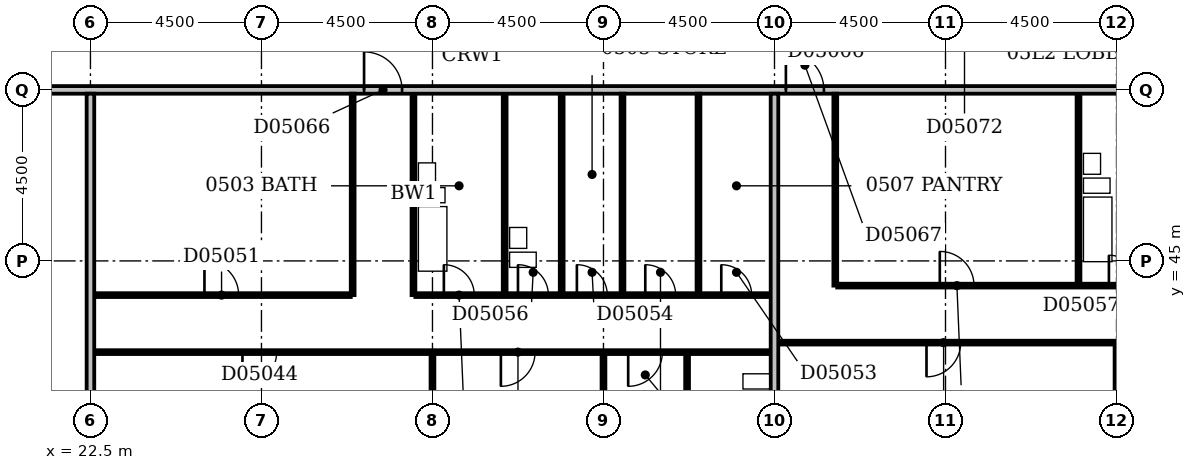
"""IFC4 building model, lengths in metres.
Left out: names, types, materials, properties, quantities, classifications, styles, units other than length and angle.
Written with IfcOpenShell. Run it as: python <this file> out.ifc"""

import sys

from ifc_helpers import new_model, si_unit, direction, frame, frame_2d, origin, place, context, subcontext, project, spatial, rectangle, extrude, element, fill, save


model = new_model("IFC4")
c1 = context("Model", 3, precision=1e-05, world=origin(), true_north=direction((0.0, 1.0)))
c2 = subcontext(c1, "Body", "Model", "MODEL_VIEW")
j1 = project(units=[si_unit("LENGTHUNIT", "METRE"), si_unit("PLANEANGLEUNIT", "RADIAN")], contexts=[c1])
p1 = place(None, origin())
s1 = spatial("IfcSite", under=j1, at=p1, CompositionType="ELEMENT")
p2 = place(p1, origin())
s2 = spatial("IfcBuilding", under=s1, at=p2, CompositionType="ELEMENT")
p3 = place(p2, frame((0.0, 0.0, 29.0)))
s3 = spatial("IfcBuildingStorey", under=s2, at=p3, CompositionType="ELEMENT", Elevation=29.0)
p4 = place(p3, frame((22.5, 36.6, 0.0), z_axis=(0.0, 0.0, 1.0), x_axis=(0.0, 1.0, 0.0)))
e1 = element("IfcWall", 1, at=p4, inside=s3, PredefinedType="PARTITIONING", context=c2, shape_type="SweptSolid", body=[
    extrude(rectangle(XDim=12.8, YDim=0.2, at=frame_2d((6.4, 0.0))), origin(), (0.0, 0.0, 1.0), 3.3),
])
p5 = place(p3, frame((31.5, 36.6, 0.0), z_axis=(0.0, 0.0, 1.0), x_axis=(0.0, 1.0, 0.0)))
e2 = element("IfcWall", 2, at=p5, inside=s3, PredefinedType="PARTITIONING", context=c2, shape_type="SweptSolid", body=[
    extrude(rectangle(XDim=5.95, YDim=0.1, at=frame_2d((2.975, 0.0))), origin(), (0.0, 0.0, 1.0), 3.3),
])
p6 = place(p3, frame((36.0, 36.6, 0.0), z_axis=(0.0, 0.0, 1.0), x_axis=(0.0, 1.0, 0.0)))
e3 = element("IfcWall", 3, at=p6, inside=s3, PredefinedType="PARTITIONING", context=c2, shape_type="SweptSolid", body=[
    extrude(rectangle(XDim=5.95, YDim=0.1, at=frame_2d((2.975, 0.0))), origin(), (0.0, 0.0, 1.0), 2.4),
])
p7 = place(p3, frame((40.5, 36.6, 0.0), z_axis=(0.0, 0.0, 1.0), x_axis=(0.0, 1.0, 0.0)))
e4 = element("IfcWall", 4, at=p7, inside=s3, PredefinedType="PARTITIONING", context=c2, shape_type="SweptSolid", body=[
    extrude(rectangle(XDim=12.8, YDim=0.2, at=frame_2d((6.4, 0.0))), origin(), (0.0, 0.0, 1.0), 3.3),
])
p8 = place(p3, frame((49.5, 36.6, 0.0), z_axis=(0.0, 0.0, 1.0), x_axis=(0.0, 1.0, 0.0)))
e5 = element("IfcWall", 5, at=p8, inside=s3, PredefinedType="PARTITIONING", context=c2, shape_type="SweptSolid", body=[
    extrude(rectangle(XDim=6.2, YDim=0.1, at=frame_2d((3.1, 0.0))), origin(), (0.0, 0.0, 1.0), 3.3),
])
p9 = place(p3, frame((38.2, 39.7, 0.0), z_axis=(0.0, 0.0, 1.0), x_axis=(0.0, 1.0, 0.0)))
e6 = element("IfcWall", 6, at=p9, inside=s3, PredefinedType="PLUMBINGWALL", context=c2, shape_type="SweptSolid", body=[
    extrude(rectangle(XDim=2.85, YDim=0.1, at=frame_2d((1.425, 0.0))), origin(), (0.0, 0.0, 1.0), 3.3),
])
p10 = place(p9, frame((1.05, 0.0, 0.0)))
e7 = element("IfcOpeningElement", 7, at=p10, cuts=e6, PredefinedType="OPENING", context=c2, shape_type="SweptSolid", body=[
    extrude(rectangle(XDim=0.8, YDim=2.1, at=frame_2d((0.4, 1.05))), frame((0.0, 0.062, 0.0), z_axis=(0.0, -1.0, 0.0), x_axis=(1.0, 0.0, 0.0)), (0.0, 0.0, 1.0), 0.124),
])
p11 = place(p3, frame((22.6, 42.6, 0.0), z_axis=(0.0, 0.0, 1.0), x_axis=(1.0, 0.0, 0.0)))
e8 = element("IfcWall", 8, at=p11, inside=s3, PredefinedType="PARTITIONING", context=c2, shape_type="SweptSolid", body=[
    extrude(rectangle(XDim=17.8, YDim=0.1, at=frame_2d((8.9, 0.0))), origin(), (0.0, 0.0, 1.0), 3.3),
])
p12 = place(p11, frame((3.9, 0.0, 0.0)))
e9 = element("IfcOpeningElement", 9, at=p12, cuts=e8, PredefinedType="OPENING", context=c2, shape_type="SweptSolid", body=[
    extrude(rectangle(XDim=0.9, YDim=2.1, at=frame_2d((0.45, 1.05))), frame((0.0, 0.062, 0.0), z_axis=(0.0, -1.0, 0.0), x_axis=(1.0, 0.0, 0.0)), (0.0, 0.0, 1.0), 0.124),
])
p13 = place(p11, frame((10.7, 0.0, 0.0)))
e10 = element("IfcOpeningElement", 10, at=p13, cuts=e8, PredefinedType="OPENING", context=c2, shape_type="SweptSolid", body=[
    extrude(rectangle(XDim=0.9, YDim=2.1, at=frame_2d((0.45, 1.05))), frame((0.0, 0.062, 0.0), z_axis=(0.0, -1.0, 0.0), x_axis=(1.0, 0.0, 0.0)), (0.0, 0.0, 1.0), 0.124),
])
p14 = place(p11, frame((14.05, 0.0, 0.0)))
e11 = element("IfcOpeningElement", 11, at=p14, cuts=e8, PredefinedType="OPENING", context=c2, shape_type="SweptSolid", body=[
    extrude(rectangle(XDim=0.9, YDim=2.1, at=frame_2d((0.45, 1.05))), frame((0.0, 0.062, 0.0), z_axis=(0.0, -1.0, 0.0), x_axis=(1.0, 0.0, 0.0)), (0.0, 0.0, 1.0), 0.124),
])
p15 = place(p3, frame((40.6, 42.85, 0.0), z_axis=(0.0, 0.0, 1.0), x_axis=(1.0, 0.0, 0.0)))
e12 = element("IfcWall", 12, at=p15, inside=s3, PredefinedType="PARTITIONING", context=c2, shape_type="SweptSolid", body=[
    extrude(rectangle(XDim=13.3, YDim=0.1, at=frame_2d((6.65, 0.0))), origin(), (0.0, 0.0, 1.0), 3.3),
])
p16 = place(p15, frame((3.9, 0.0, 0.0)))
e13 = element("IfcOpeningElement", 13, at=p16, cuts=e12, PredefinedType="OPENING", context=c2, shape_type="SweptSolid", body=[
    extrude(rectangle(XDim=0.9, YDim=2.1, at=frame_2d((0.45, 1.05))), frame((0.0, 0.062, 0.0), z_axis=(0.0, -1.0, 0.0), x_axis=(1.0, 0.0, 0.0)), (0.0, 0.0, 1.0), 0.124),
])
p17 = place(p15, frame((10.7, 0.0, 0.0)))
e14 = element("IfcOpeningElement", 14, at=p17, cuts=e12, PredefinedType="OPENING", context=c2, shape_type="SweptSolid", body=[
    extrude(rectangle(XDim=0.9, YDim=2.1, at=frame_2d((0.45, 1.05))), frame((0.0, 0.062, 0.0), z_axis=(0.0, -1.0, 0.0), x_axis=(1.0, 0.0, 0.0)), (0.0, 0.0, 1.0), 0.124),
])
p18 = place(p3, frame((22.6, 44.1, 0.0), z_axis=(0.0, 0.0, 1.0), x_axis=(1.0, 0.0, 0.0)))
e15 = element("IfcWall", 15, at=p18, inside=s3, PredefinedType="PARTITIONING", context=c2, shape_type="SweptSolid", body=[
    extrude(rectangle(XDim=6.75, YDim=0.1, at=frame_2d((3.375, 0.0))), origin(), (0.0, 0.0, 1.0), 3.3),
])
p19 = place(p18, frame((2.9, 0.0, 0.0)))
e16 = element("IfcOpeningElement", 16, at=p19, cuts=e15, PredefinedType="OPENING", context=c2, shape_type="SweptSolid", body=[
    extrude(rectangle(XDim=0.9, YDim=2.1, at=frame_2d((0.45, 1.05))), frame((0.0, 0.062, 0.0), z_axis=(0.0, -1.0, 0.0), x_axis=(1.0, 0.0, 0.0)), (0.0, 0.0, 1.0), 0.124),
])
p20 = place(p3, frame((29.4, 44.1, 0.0), z_axis=(0.0, 0.0, 1.0), x_axis=(0.0, 1.0, 0.0)))
e17 = element("IfcWall", 17, at=p20, inside=s3, PredefinedType="PARTITIONING", context=c2, shape_type="SweptSolid", body=[
    extrude(rectangle(XDim=5.3, YDim=0.1, at=frame_2d((2.65, 0.0))), origin(), (0.0, 0.0, 1.0), 3.3),
])
p21 = place(p3, frame((31.0, 44.1, 0.0), z_axis=(0.0, 0.0, 1.0), x_axis=(0.0, 1.0, 0.0)))
e18 = element("IfcWall", 18, at=p21, inside=s3, PredefinedType="PLUMBINGWALL", context=c2, shape_type="SweptSolid", body=[
    extrude(rectangle(XDim=5.3, YDim=0.1, at=frame_2d((2.65, 0.0))), origin(), (0.0, 0.0, 1.0), 3.3),
])
p22 = place(p3, frame((31.05, 44.1, 0.0), z_axis=(0.0, 0.0, 1.0), x_axis=(1.0, 0.0, 0.0)))
e19 = element("IfcWall", 19, at=p22, inside=s3, PredefinedType="PARTITIONING", context=c2, shape_type="SweptSolid", body=[
    extrude(rectangle(XDim=9.35, YDim=0.1, at=frame_2d((4.675, 0.0))), origin(), (0.0, 0.0, 1.0), 3.3),
])
p23 = place(p22, frame((0.75, 0.0, 0.0)))
e20 = element("IfcOpeningElement", 20, at=p23, cuts=e19, PredefinedType="OPENING", context=c2, shape_type="SweptSolid", body=[
    extrude(rectangle(XDim=0.8, YDim=2.1, at=frame_2d((0.4, 1.05))), frame((0.0, 0.062, 0.0), z_axis=(0.0, -1.0, 0.0), x_axis=(1.0, 0.0, 0.0)), (0.0, 0.0, 1.0), 0.124),
])
p24 = place(p22, frame((8.05, 0.0, 0.0)))
e21 = element("IfcOpeningElement", 21, at=p24, cuts=e19, PredefinedType="OPENING", context=c2, shape_type="SweptSolid", body=[
    extrude(rectangle(XDim=0.8, YDim=2.1, at=frame_2d((0.4, 1.05))), frame((0.0, 0.062, 0.0), z_axis=(0.0, -1.0, 0.0), x_axis=(1.0, 0.0, 0.0)), (0.0, 0.0, 1.0), 0.124),
])
p25 = place(p22, frame((4.25, 0.0, 0.0)))
e22 = element("IfcOpeningElement", 22, at=p25, cuts=e19, PredefinedType="OPENING", context=c2, shape_type="SweptSolid", body=[
    extrude(rectangle(XDim=0.8, YDim=2.1, at=frame_2d((0.4, 1.05))), frame((0.0, 0.062, 0.0), z_axis=(0.0, -1.0, 0.0), x_axis=(1.0, 0.0, 0.0)), (0.0, 0.0, 1.0), 0.124),
])
p26 = place(p22, frame((6.05, 0.0, 0.0)))
e23 = element("IfcOpeningElement", 23, at=p26, cuts=e19, PredefinedType="OPENING", context=c2, shape_type="SweptSolid", body=[
    extrude(rectangle(XDim=0.8, YDim=2.1, at=frame_2d((0.4, 1.05))), frame((0.0, 0.062, 0.0), z_axis=(0.0, -1.0, 0.0), x_axis=(1.0, 0.0, 0.0)), (0.0, 0.0, 1.0), 0.124),
])
p27 = place(p22, frame((2.7, 0.0, 0.0)))
e24 = element("IfcOpeningElement", 24, at=p27, cuts=e19, PredefinedType="OPENING", context=c2, shape_type="SweptSolid", body=[
    extrude(rectangle(XDim=0.8, YDim=2.1, at=frame_2d((0.4, 1.05))), frame((0.0, 0.062, 0.0), z_axis=(0.0, -1.0, 0.0), x_axis=(1.0, 0.0, 0.0)), (0.0, 0.0, 1.0), 0.124),
])
for number, where, z_axis, x_axis in (
    (25, (33.4, 44.15, 0.0), (0.0, 0.0, 1.0), (0.0, 1.0, 0.0)),
    (26, (34.9, 44.15, 0.0), (0.0, 0.0, 1.0), (0.0, 1.0, 0.0)),
):
    element("IfcWall", number, at=place(p3, frame(where, z_axis=z_axis, x_axis=x_axis)), inside=s3, PredefinedType="PLUMBINGWALL", context=c2, shape_type="SweptSolid", body=[
        extrude(rectangle(XDim=5.25, YDim=0.1, at=frame_2d((2.625, 0.0))), origin(), (0.0, 0.0, 1.0), 3.3),
    ])
p28 = place(p3, frame((36.5, 44.15, 0.0), z_axis=(0.0, 0.0, 1.0), x_axis=(0.0, 1.0, 0.0)))
e27 = element("IfcWall", 27, at=p28, inside=s3, PredefinedType="PARTITIONING", context=c2, shape_type="SweptSolid", body=[
    extrude(rectangle(XDim=5.25, YDim=0.1, at=frame_2d((2.625, 0.0))), origin(), (0.0, 0.0, 1.0), 2.4),
])
p29 = place(p3, frame((38.5, 44.15, 0.0), z_axis=(0.0, 0.0, 1.0), x_axis=(0.0, 1.0, 0.0)))
e28 = element("IfcWall", 28, at=p29, inside=s3, PredefinedType="PARTITIONING", context=c2, shape_type="SweptSolid", body=[
    extrude(rectangle(XDim=5.25, YDim=0.1, at=frame_2d((2.625, 0.0))), origin(), (0.0, 0.0, 1.0), 3.3),
])
p30 = place(p3, frame((42.1, 44.35, 0.0), z_axis=(0.0, 0.0, 1.0), x_axis=(0.0, 1.0, 0.0)))
e29 = element("IfcWall", 29, at=p30, inside=s3, PredefinedType="PARTITIONING", context=c2, shape_type="SweptSolid", body=[
    extrude(rectangle(XDim=5.05, YDim=0.1, at=frame_2d((2.525, 0.0))), origin(), (0.0, 0.0, 1.0), 3.3),
])
p31 = place(p3, frame((42.15, 44.35, 0.0), z_axis=(0.0, 0.0, 1.0), x_axis=(1.0, 0.0, 0.0)))
e30 = element("IfcWall", 30, at=p31, inside=s3, PredefinedType="PARTITIONING", context=c2, shape_type="SweptSolid", body=[
    extrude(rectangle(XDim=11.75, YDim=0.1, at=frame_2d((5.875, 0.0))), origin(), (0.0, 0.0, 1.0), 3.3),
])
p32 = place(p31, frame((7.15, 0.0, 0.0)))
e31 = element("IfcOpeningElement", 31, at=p32, cuts=e30, PredefinedType="OPENING", context=c2, shape_type="SweptSolid", body=[
    extrude(rectangle(XDim=0.8, YDim=2.1, at=frame_2d((0.4, 1.05))), frame((0.0, 0.062, 0.0), z_axis=(0.0, -1.0, 0.0), x_axis=(1.0, 0.0, 0.0)), (0.0, 0.0, 1.0), 0.124),
])
p33 = place(p31, frame((2.7, 0.0, 0.0)))
e32 = element("IfcOpeningElement", 32, at=p33, cuts=e30, PredefinedType="OPENING", context=c2, shape_type="SweptSolid", body=[
    extrude(rectangle(XDim=0.9, YDim=2.1, at=frame_2d((0.45, 1.05))), frame((0.0, 0.062, 0.0), z_axis=(0.0, -1.0, 0.0), x_axis=(1.0, 0.0, 0.0)), (0.0, 0.0, 1.0), 0.124),
])
p34 = place(p31, frame((10.65, 0.0, 0.0)))
e33 = element("IfcOpeningElement", 33, at=p34, cuts=e30, PredefinedType="OPENING", context=c2, shape_type="SweptSolid", body=[
    extrude(rectangle(XDim=0.8, YDim=2.1, at=frame_2d((0.4, 1.05))), frame((0.0, 0.062, 0.0), z_axis=(0.0, -1.0, 0.0), x_axis=(1.0, 0.0, 0.0)), (0.0, 0.0, 1.0), 0.124),
])
p35 = place(p31, frame((9.1, 0.0, 0.0)))
e34 = element("IfcOpeningElement", 34, at=p35, cuts=e30, PredefinedType="OPENING", context=c2, shape_type="SweptSolid", body=[
    extrude(rectangle(XDim=0.8, YDim=2.1, at=frame_2d((0.4, 1.05))), frame((0.0, 0.062, 0.0), z_axis=(0.0, -1.0, 0.0), x_axis=(1.0, 0.0, 0.0)), (0.0, 0.0, 1.0), 0.124),
])
p36 = place(p3, frame((48.5, 44.4, 0.0), z_axis=(0.0, 0.0, 1.0), x_axis=(0.0, 1.0, 0.0)))
e35 = element("IfcWall", 35, at=p36, inside=s3, PredefinedType="PLUMBINGWALL", context=c2, shape_type="SweptSolid", body=[
    extrude(rectangle(XDim=5.0, YDim=0.1, at=frame_2d((2.5, 0.0))), origin(), (0.0, 0.0, 1.0), 3.3),
])
p37 = place(p3, frame((9.1, 49.5, 0.0), z_axis=(0.0, 0.0, 1.0), x_axis=(1.0, 0.0, 0.0)))
e36 = element("IfcWall", 36, at=p37, inside=s3, PredefinedType="PARTITIONING", context=c2, shape_type="SweptSolid", body=[
    extrude(rectangle(XDim=57.8, YDim=0.2, at=frame_2d((28.9, 0.0))), origin(), (0.0, 0.0, 1.0), 3.3),
])
p38 = place(p37, frame((20.6, 0.0, 0.0)))
e37 = element("IfcOpeningElement", 37, at=p38, cuts=e36, PredefinedType="OPENING", context=c2, shape_type="SweptSolid", body=[
    extrude(rectangle(XDim=1.0, YDim=2.1, at=frame_2d((0.5, 1.05))), frame((0.0, 0.112, 0.0), z_axis=(0.0, -1.0, 0.0), x_axis=(1.0, 0.0, 0.0)), (0.0, 0.0, 1.0), 0.224),
])
p39 = place(p37, frame((31.7, 0.0, 0.0)))
e38 = element("IfcOpeningElement", 38, at=p39, cuts=e36, PredefinedType="OPENING", context=c2, shape_type="SweptSolid", body=[
    extrude(rectangle(XDim=1.0, YDim=2.1, at=frame_2d((0.5, 1.05))), frame((0.0, 0.112, 0.0), z_axis=(0.0, -1.0, 0.0), x_axis=(1.0, 0.0, 0.0)), (0.0, 0.0, 1.0), 0.224),
])
p40 = place(p37, frame((47.6, 0.0, 0.0)))
e39 = element("IfcOpeningElement", 39, at=p40, cuts=e36, PredefinedType="OPENING", context=c2, shape_type="SweptSolid", body=[
    extrude(rectangle(XDim=1.0, YDim=2.1, at=frame_2d((0.5, 1.05))), frame((0.0, 0.112, 0.0), z_axis=(0.0, -1.0, 0.0), x_axis=(1.0, 0.0, 0.0)), (0.0, 0.0, 1.0), 0.224),
])
p41 = place(p37, frame((54.15, 0.0, 0.0)))
e40 = element("IfcOpeningElement", 40, at=p41, cuts=e36, PredefinedType="OPENING", context=c2, shape_type="SweptSolid", body=[
    extrude(rectangle(XDim=1.0, YDim=2.1, at=frame_2d((0.5, 1.05))), frame((0.0, 0.112, 0.0), z_axis=(0.0, -1.0, 0.0), x_axis=(1.0, 0.0, 0.0)), (0.0, 0.0, 1.0), 0.224),
])
p42 = place(p37, frame((10.65, 0.0, 0.0)))
e41 = element("IfcOpeningElement", 41, at=p42, cuts=e36, PredefinedType="OPENING", context=c2, shape_type="SweptSolid", body=[
    extrude(rectangle(XDim=0.9, YDim=2.1, at=frame_2d((0.45, 1.05))), frame((0.0, 0.112, 0.0), z_axis=(0.0, -1.0, 0.0), x_axis=(1.0, 0.0, 0.0)), (0.0, 0.0, 1.0), 0.224),
])
p43 = place(p12, frame((0.9, 0.0, 0.0), z_axis=(0.0, 0.0, 1.0), x_axis=(-1.0, 0.0, 0.0)))
e42 = element("IfcDoor", 42, at=p43, inside=s3, OperationType="SINGLE_SWING_RIGHT", PredefinedType="DOOR", context=c2, shape_type="SweptSolid", body=[
    extrude(rectangle(XDim=0.9, YDim=2.1, at=frame_2d((0.45, 1.05))), frame((0.0, 0.025, 0.0), z_axis=(0.0, -1.0, 0.0), x_axis=(1.0, 0.0, 0.0)), (0.0, 0.0, 1.0), 0.05),
])
fill(e9, e42)
p44 = place(p13, frame((0.9, 0.0, 0.0), z_axis=(0.0, 0.0, 1.0), x_axis=(-1.0, 0.0, 0.0)))
e43 = element("IfcDoor", 43, at=p44, inside=s3, OperationType="SINGLE_SWING_RIGHT", PredefinedType="DOOR", context=c2, shape_type="SweptSolid", body=[
    extrude(rectangle(XDim=0.9, YDim=2.1, at=frame_2d((0.45, 1.05))), frame((0.0, 0.025, 0.0), z_axis=(0.0, -1.0, 0.0), x_axis=(1.0, 0.0, 0.0)), (0.0, 0.0, 1.0), 0.05),
])
fill(e10, e43)
p45 = place(p14, frame((0.9, 0.0, 0.0), z_axis=(0.0, 0.0, 1.0), x_axis=(-1.0, 0.0, 0.0)))
e44 = element("IfcDoor", 44, at=p45, inside=s3, OperationType="SINGLE_SWING_RIGHT", PredefinedType="DOOR", context=c2, shape_type="SweptSolid", body=[
    extrude(rectangle(XDim=0.9, YDim=2.1, at=frame_2d((0.45, 1.05))), frame((0.0, 0.025, 0.0), z_axis=(0.0, -1.0, 0.0), x_axis=(1.0, 0.0, 0.0)), (0.0, 0.0, 1.0), 0.05),
])
fill(e11, e44)
p46 = place(p16, frame((0.9, 0.0, 0.0), z_axis=(0.0, 0.0, 1.0), x_axis=(-1.0, 0.0, 0.0)))
e45 = element("IfcDoor", 45, at=p46, inside=s3, OperationType="SINGLE_SWING_RIGHT", PredefinedType="DOOR", context=c2, shape_type="SweptSolid", body=[
    extrude(rectangle(XDim=0.9, YDim=2.1, at=frame_2d((0.45, 1.05))), frame((0.0, 0.025, 0.0), z_axis=(0.0, -1.0, 0.0), x_axis=(1.0, 0.0, 0.0)), (0.0, 0.0, 1.0), 0.05),
])
fill(e13, e45)
p47 = place(p19, origin())
e46 = element("IfcDoor", 46, at=p47, inside=s3, OperationType="SINGLE_SWING_LEFT", PredefinedType="DOOR", context=c2, shape_type="SweptSolid", body=[
    extrude(rectangle(XDim=0.9, YDim=2.1, at=frame_2d((0.45, 1.05))), frame((0.0, 0.025, 0.0), z_axis=(0.0, -1.0, 0.0), x_axis=(1.0, 0.0, 0.0)), (0.0, 0.0, 1.0), 0.05),
])
fill(e16, e46)
p48 = place(p23, origin())
e47 = element("IfcDoor", 47, at=p48, inside=s3, OperationType="SINGLE_SWING_LEFT", PredefinedType="DOOR", context=c2, shape_type="SweptSolid", body=[
    extrude(rectangle(XDim=0.8, YDim=2.1, at=frame_2d((0.4, 1.05))), frame((0.0, 0.025, 0.0), z_axis=(0.0, -1.0, 0.0), x_axis=(1.0, 0.0, 0.0)), (0.0, 0.0, 1.0), 0.05),
])
fill(e20, e47)
p49 = place(p24, origin())
e48 = element("IfcDoor", 48, at=p49, inside=s3, OperationType="SINGLE_SWING_LEFT", PredefinedType="DOOR", context=c2, shape_type="SweptSolid", body=[
    extrude(rectangle(XDim=0.8, YDim=2.1, at=frame_2d((0.4, 1.05))), frame((0.0, 0.025, 0.0), z_axis=(0.0, -1.0, 0.0), x_axis=(1.0, 0.0, 0.0)), (0.0, 0.0, 1.0), 0.05),
])
fill(e21, e48)
p50 = place(p25, origin())
e49 = element("IfcDoor", 49, at=p50, inside=s3, OperationType="SINGLE_SWING_LEFT", PredefinedType="DOOR", context=c2, shape_type="SweptSolid", body=[
    extrude(rectangle(XDim=0.8, YDim=2.1, at=frame_2d((0.4, 1.05))), frame((0.0, 0.025, 0.0), z_axis=(0.0, -1.0, 0.0), x_axis=(1.0, 0.0, 0.0)), (0.0, 0.0, 1.0), 0.05),
])
fill(e22, e49)
p51 = place(p26, origin())
e50 = element("IfcDoor", 50, at=p51, inside=s3, OperationType="SINGLE_SWING_LEFT", PredefinedType="DOOR", context=c2, shape_type="SweptSolid", body=[
    extrude(rectangle(XDim=0.8, YDim=2.1, at=frame_2d((0.4, 1.05))), frame((0.0, 0.025, 0.0), z_axis=(0.0, -1.0, 0.0), x_axis=(1.0, 0.0, 0.0)), (0.0, 0.0, 1.0), 0.05),
])
fill(e23, e50)
p52 = place(p27, origin())
e51 = element("IfcDoor", 51, at=p52, inside=s3, OperationType="SINGLE_SWING_LEFT", PredefinedType="DOOR", context=c2, shape_type="SweptSolid", body=[
    extrude(rectangle(XDim=0.8, YDim=2.1, at=frame_2d((0.4, 1.05))), frame((0.0, 0.025, 0.0), z_axis=(0.0, -1.0, 0.0), x_axis=(1.0, 0.0, 0.0)), (0.0, 0.0, 1.0), 0.05),
])
fill(e24, e51)
p53 = place(p32, origin())
e52 = element("IfcDoor", 52, at=p53, inside=s3, OperationType="SINGLE_SWING_LEFT", PredefinedType="DOOR", context=c2, shape_type="SweptSolid", body=[
    extrude(rectangle(XDim=0.8, YDim=2.1, at=frame_2d((0.4, 1.05))), frame((0.0, 0.025, 0.0), z_axis=(0.0, -1.0, 0.0), x_axis=(1.0, 0.0, 0.0)), (0.0, 0.0, 1.0), 0.05),
])
fill(e31, e52)
p54 = place(p33, origin())
e53 = element("IfcDoor", 53, at=p54, inside=s3, OperationType="SINGLE_SWING_LEFT", PredefinedType="DOOR", context=c2, shape_type="SweptSolid", body=[
    extrude(rectangle(XDim=0.9, YDim=2.1, at=frame_2d((0.45, 1.05))), frame((0.0, 0.025, 0.0), z_axis=(0.0, -1.0, 0.0), x_axis=(1.0, 0.0, 0.0)), (0.0, 0.0, 1.0), 0.05),
])
fill(e32, e53)
p55 = place(p38, origin())
e54 = element("IfcDoor", 54, at=p55, inside=s3, OperationType="SINGLE_SWING_LEFT", PredefinedType="DOOR", context=c2, shape_type="SweptSolid", body=[
    extrude(rectangle(XDim=1.0, YDim=2.1, at=frame_2d((0.5, 1.05))), frame((0.0, 0.025, 0.0), z_axis=(0.0, -1.0, 0.0), x_axis=(1.0, 0.0, 0.0)), (0.0, 0.0, 1.0), 0.05),
])
fill(e37, e54)
p56 = place(p39, origin())
e55 = element("IfcDoor", 55, at=p56, inside=s3, OperationType="SINGLE_SWING_LEFT", PredefinedType="DOOR", context=c2, shape_type="SweptSolid", body=[
    extrude(rectangle(XDim=1.0, YDim=2.1, at=frame_2d((0.5, 1.05))), frame((0.0, 0.025, 0.0), z_axis=(0.0, -1.0, 0.0), x_axis=(1.0, 0.0, 0.0)), (0.0, 0.0, 1.0), 0.05),
])
fill(e38, e55)
save(model, sys.argv[1])
